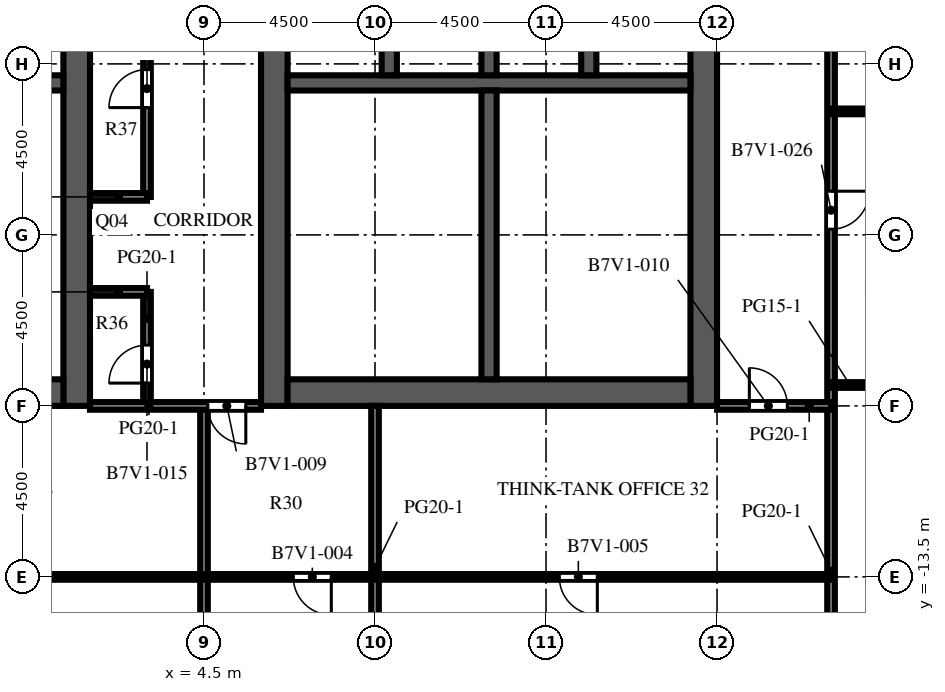
"""IFC4 building model, lengths in metres.
Left out: names, types, materials, properties, quantities, classifications, styles, units other than length and angle.
Written with IfcOpenShell. Run it as: python <this file> out.ifc"""

import sys

from ifc_helpers import new_model, si_unit, direction, frame, frame_2d, origin, place, context, subcontext, project, spatial, rectangle, extrude, element, fill, save


model = new_model("IFC4")
c1 = context("Model", 3, precision=1e-05, world=origin(), true_north=direction((0.0, 1.0)))
c2 = subcontext(c1, "Body", "Model", "MODEL_VIEW")
j1 = project(units=[si_unit("LENGTHUNIT", "METRE"), si_unit("PLANEANGLEUNIT", "RADIAN")], contexts=[c1])
p1 = place(None, origin())
s1 = spatial("IfcSite", under=j1, at=p1, CompositionType="ELEMENT")
p2 = place(p1, origin())
s2 = spatial("IfcBuilding", under=s1, at=p2, CompositionType="ELEMENT")
p3 = place(p2, frame((0.0, 0.0, 248.0)))
s3 = spatial("IfcBuildingStorey", under=s2, at=p3, CompositionType="ELEMENT", Elevation=248.0)
p4 = place(p3, frame((1.15, -9.0, 0.0), z_axis=(0.0, 0.0, 1.0), x_axis=(0.0, 1.0, 0.0)))
e1 = element("IfcWall", 1, at=p4, inside=s3, PredefinedType="SHEAR", context=c2, shape_type="SweptSolid", body=[
    extrude(rectangle(XDim=27.5, YDim=0.7, at=frame_2d((13.75, 0.0))), origin(), (0.0, 0.0, 1.0), 4.1),
])
p5 = place(p4, frame((12.55, 0.0, 0.0)))
e2 = element("IfcOpeningElement", 2, at=p5, cuts=e1, PredefinedType="OPENING", context=c2, shape_type="SweptSolid", body=[
    extrude(rectangle(XDim=2.4, YDim=2.4, at=frame_2d((1.2, 1.2))), frame((0.0, 0.36, 0.0), z_axis=(0.0, -1.0, 0.0), x_axis=(1.0, 0.0, 0.0)), (0.0, 0.0, 1.0), 0.72),
])
p6 = place(p4, frame((3.9, 0.0, 0.0)))
e3 = element("IfcOpeningElement", 3, at=p6, cuts=e1, PredefinedType="OPENING", context=c2, shape_type="SweptSolid", body=[
    extrude(rectangle(XDim=1.2, YDim=2.1, at=frame_2d((0.6, 1.05))), frame((0.0, 0.36, 0.0), z_axis=(0.0, -1.0, 0.0), x_axis=(1.0, 0.0, 0.0)), (0.0, 0.0, 1.0), 0.72),
])
p7 = place(p4, frame((22.4, 0.0, 0.0)))
e4 = element("IfcOpeningElement", 4, at=p7, cuts=e1, PredefinedType="OPENING", context=c2, shape_type="SweptSolid", body=[
    extrude(rectangle(XDim=1.2, YDim=2.1, at=frame_2d((0.6, 1.05))), frame((0.0, 0.36, 0.0), z_axis=(0.0, -1.0, 0.0), x_axis=(1.0, 0.0, 0.0)), (0.0, 0.0, 1.0), 0.72),
])
p8 = place(p3, frame((-9.8, -8.65, 0.0), z_axis=(0.0, 0.0, 1.0), x_axis=(1.0, 0.0, 0.0)))
e5 = element("IfcWall", 5, at=p8, inside=s3, PredefinedType="SHEAR", context=c2, shape_type="SweptSolid", body=[
    extrude(rectangle(XDim=10.6, YDim=0.7, at=frame_2d((5.3, 0.0))), origin(), (0.0, 0.0, 1.0), 4.1),
])
p9 = place(p3, frame((-9.8, -0.5, 0.0), z_axis=(0.0, 0.0, 1.0), x_axis=(1.0, 0.0, 0.0)))
e6 = element("IfcWall", 6, at=p9, inside=s3, PredefinedType="SHEAR", context=c2, shape_type="SweptSolid", body=[
    extrude(rectangle(XDim=10.6, YDim=0.4, at=frame_2d((5.3, 0.0))), origin(), (0.0, 0.0, 1.0), 4.1),
])
p10 = place(p3, frame((6.35, -9.0, 0.0), z_axis=(0.0, 0.0, 1.0), x_axis=(0.0, 1.0, 0.0)))
e7 = element("IfcWall", 7, at=p10, inside=s3, PredefinedType="SHEAR", context=c2, shape_type="SweptSolid", body=[
    extrude(rectangle(XDim=27.5, YDim=0.7, at=frame_2d((13.75, 0.0))), origin(), (0.0, 0.0, 1.0), 4.1),
])
p11 = place(p10, frame((12.55, 0.0, 0.0)))
e8 = element("IfcOpeningElement", 8, at=p11, cuts=e7, PredefinedType="OPENING", context=c2, shape_type="SweptSolid", body=[
    extrude(rectangle(XDim=2.4, YDim=2.4, at=frame_2d((1.2, 1.2))), frame((0.0, 0.36, 0.0), z_axis=(0.0, -1.0, 0.0), x_axis=(1.0, 0.0, 0.0)), (0.0, 0.0, 1.0), 0.72),
])
p12 = place(p10, frame((3.9, 0.0, 0.0)))
e9 = element("IfcOpeningElement", 9, at=p12, cuts=e7, PredefinedType="OPENING", context=c2, shape_type="SweptSolid", body=[
    extrude(rectangle(XDim=1.2, YDim=2.1, at=frame_2d((0.6, 1.05))), frame((0.0, 0.36, 0.0), z_axis=(0.0, -1.0, 0.0), x_axis=(1.0, 0.0, 0.0)), (0.0, 0.0, 1.0), 0.72),
])
p13 = place(p10, frame((22.4, 0.0, 0.0)))
e10 = element("IfcOpeningElement", 10, at=p13, cuts=e7, PredefinedType="OPENING", context=c2, shape_type="SweptSolid", body=[
    extrude(rectangle(XDim=1.2, YDim=2.1, at=frame_2d((0.6, 1.05))), frame((0.0, 0.36, 0.0), z_axis=(0.0, -1.0, 0.0), x_axis=(1.0, 0.0, 0.0)), (0.0, 0.0, 1.0), 0.72),
])
p14 = place(p3, frame((17.65, -9.0, 0.0), z_axis=(0.0, 0.0, 1.0), x_axis=(0.0, 1.0, 0.0)))
e11 = element("IfcWall", 11, at=p14, inside=s3, PredefinedType="SHEAR", context=c2, shape_type="SweptSolid", body=[
    extrude(rectangle(XDim=27.5, YDim=0.7, at=frame_2d((13.75, 0.0))), origin(), (0.0, 0.0, 1.0), 4.1),
])
p15 = place(p14, frame((12.55, 0.0, 0.0)))
e12 = element("IfcOpeningElement", 12, at=p15, cuts=e11, PredefinedType="OPENING", context=c2, shape_type="SweptSolid", body=[
    extrude(rectangle(XDim=2.4, YDim=2.4, at=frame_2d((1.2, 1.2))), frame((0.0, 0.36, 0.0), z_axis=(0.0, -1.0, 0.0), x_axis=(1.0, 0.0, 0.0)), (0.0, 0.0, 1.0), 0.72),
])
p16 = place(p14, frame((6.825, 0.0, 0.0)))
e13 = element("IfcOpeningElement", 13, at=p16, cuts=e11, PredefinedType="OPENING", context=c2, shape_type="SweptSolid", body=[
    extrude(rectangle(XDim=1.2, YDim=2.1, at=frame_2d((0.6, 1.05))), frame((0.0, 0.36, 0.0), z_axis=(0.0, -1.0, 0.0), x_axis=(1.0, 0.0, 0.0)), (0.0, 0.0, 1.0), 0.72),
])
p17 = place(p14, frame((19.475, 0.0, 0.0)))
e14 = element("IfcOpeningElement", 14, at=p17, cuts=e11, PredefinedType="OPENING", context=c2, shape_type="SweptSolid", body=[
    extrude(rectangle(XDim=1.2, YDim=2.1, at=frame_2d((0.6, 1.05))), frame((0.0, 0.36, 0.0), z_axis=(0.0, -1.0, 0.0), x_axis=(1.0, 0.0, 0.0)), (0.0, 0.0, 1.0), 0.72),
])
p18 = place(p3, frame((6.7, -8.65, 0.0), z_axis=(0.0, 0.0, 1.0), x_axis=(1.0, 0.0, 0.0)))
e15 = element("IfcWall", 15, at=p18, inside=s3, PredefinedType="SHEAR", context=c2, shape_type="SweptSolid", body=[
    extrude(rectangle(XDim=10.6, YDim=0.7, at=frame_2d((5.3, 0.0))), origin(), (0.0, 0.0, 1.0), 4.1),
])
p19 = place(p3, frame((6.7, -0.5, 0.0), z_axis=(0.0, 0.0, 1.0), x_axis=(1.0, 0.0, 0.0)))
e16 = element("IfcWall", 16, at=p19, inside=s3, PredefinedType="SHEAR", context=c2, shape_type="SweptSolid", body=[
    extrude(rectangle(XDim=10.6, YDim=0.4, at=frame_2d((5.3, 0.0))), origin(), (0.0, 0.0, 1.0), 4.1),
])
for number, where, z_axis, x_axis in (
    (17, (9.375, -0.3, 0.0), (0.0, 0.0, 1.0), (0.0, 1.0, 0.0)),
    (18, (12.0, -0.3, 0.0), (0.0, 0.0, 1.0), (0.0, 1.0, 0.0)),
    (19, (14.625, -0.3, 0.0), (0.0, 0.0, 1.0), (0.0, 1.0, 0.0)),
):
    element("IfcWall", number, at=place(p3, frame(where, z_axis=z_axis, x_axis=x_axis)), inside=s3, PredefinedType="SHEAR", context=c2, shape_type="SweptSolid", body=[
        extrude(rectangle(XDim=2.9, YDim=0.4, at=frame_2d((1.45, 0.0))), origin(), (0.0, 0.0, 1.0), 4.1),
    ])
p20 = place(p3, frame((12.0, -8.3, 0.0), z_axis=(0.0, 0.0, 1.0), x_axis=(0.0, 1.0, 0.0)))
e20 = element("IfcWall", 20, at=p20, inside=s3, PredefinedType="SHEAR", context=c2, shape_type="SweptSolid", body=[
    extrude(rectangle(XDim=7.6, YDim=0.4, at=frame_2d((3.8, 0.0))), origin(), (0.0, 0.0, 1.0), 4.1),
])
p21 = place(p3, frame((8.2, -8.3, 0.0), z_axis=(0.0, 0.0, 1.0), x_axis=(0.0, 1.0, 0.0)))
e21 = element("IfcWall", 21, at=p21, inside=s3, PredefinedType="PARTITIONING", context=c2, shape_type="SweptSolid", body=[
    extrude(rectangle(XDim=2.584, YDim=0.1, at=frame_2d((1.292, 0.0))), origin(), (0.0, 0.0, 1.0), 3.65),
])
p22 = place(p21, frame((0.792, 0.0, 0.0)))
e22 = element("IfcOpeningElement", 22, at=p22, cuts=e21, PredefinedType="OPENING", context=c2, shape_type="SweptSolid", body=[
    extrude(rectangle(XDim=1.0, YDim=2.1, at=frame_2d((0.5, 1.05))), frame((0.0, 0.06, 0.0), z_axis=(0.0, -1.0, 0.0), x_axis=(1.0, 0.0, 0.0)), (0.0, 0.0, 1.0), 0.12),
])
p23 = place(p3, frame((8.2, -5.716, 0.0), z_axis=(0.0, 0.0, 1.0), x_axis=(0.0, 1.0, 0.0)))
e23 = element("IfcWall", 23, at=p23, inside=s3, PredefinedType="PARTITIONING", context=c2, shape_type="SweptSolid", body=[
    extrude(rectangle(XDim=2.128, YDim=0.1, at=frame_2d((1.064, 0.0))), origin(), (0.0, 0.0, 1.0), 3.65),
])
p24 = place(p23, frame((0.564, 0.0, 0.0)))
e24 = element("IfcOpeningElement", 24, at=p24, cuts=e23, PredefinedType="OPENING", context=c2, shape_type="SweptSolid", body=[
    extrude(rectangle(XDim=1.0, YDim=2.1, at=frame_2d((0.5, 1.05))), frame((0.0, 0.06, 0.0), z_axis=(0.0, -1.0, 0.0), x_axis=(1.0, 0.0, 0.0)), (0.0, 0.0, 1.0), 0.12),
])
p25 = place(p3, frame((8.2, -3.588, 0.0), z_axis=(0.0, 0.0, 1.0), x_axis=(0.0, 1.0, 0.0)))
e25 = element("IfcWall", 25, at=p25, inside=s3, PredefinedType="PARTITIONING", context=c2, shape_type="SweptSolid", body=[
    extrude(rectangle(XDim=2.888, YDim=0.1, at=frame_2d((1.444, 0.0))), origin(), (0.0, 0.0, 1.0), 3.65),
])
p26 = place(p25, frame((0.944, 0.0, 0.0)))
e26 = element("IfcOpeningElement", 26, at=p26, cuts=e25, PredefinedType="OPENING", context=c2, shape_type="SweptSolid", body=[
    extrude(rectangle(XDim=1.0, YDim=2.1, at=frame_2d((0.5, 1.05))), frame((0.0, 0.06, 0.0), z_axis=(0.0, -1.0, 0.0), x_axis=(1.0, 0.0, 0.0)), (0.0, 0.0, 1.0), 0.12),
])
for number, where, z_axis, x_axis in (
    (27, (8.2, -5.716, 0.0), (0.0, 0.0, 1.0), (1.0, 0.0, 0.0)),
    (28, (8.2, -3.588, 0.0), (0.0, 0.0, 1.0), (1.0, 0.0, 0.0)),
):
    element("IfcWall", number, at=place(p3, frame(where, z_axis=z_axis, x_axis=x_axis)), inside=s3, PredefinedType="PARTITIONING", context=c2, shape_type="SweptSolid", body=[
        extrude(rectangle(XDim=3.6, YDim=0.1, at=frame_2d((1.8, 0.0))), origin(), (0.0, 0.0, 1.0), 3.65),
    ])
p27 = place(p3, frame((3.0, -9.0, 0.0), z_axis=(0.0, 0.0, 1.0), x_axis=(0.0, 1.0, 0.0)))
e29 = element("IfcWall", 29, at=p27, inside=s3, PredefinedType="PARTITIONING", context=c2, shape_type="SweptSolid", body=[
    extrude(rectangle(XDim=3.0, YDim=0.2, at=frame_2d((1.5, 0.0))), origin(), (0.0, 0.0, 1.0), 3.65),
])
p28 = place(p27, frame((0.6, 0.0, 0.0)))
e30 = element("IfcOpeningElement", 30, at=p28, cuts=e29, PredefinedType="OPENING", context=c2, shape_type="SweptSolid", body=[
    extrude(rectangle(XDim=1.0, YDim=2.1, at=frame_2d((0.5, 1.05))), frame((0.0, 0.11, 0.0), z_axis=(0.0, -1.0, 0.0), x_axis=(1.0, 0.0, 0.0)), (0.0, 0.0, 1.0), 0.22),
])
p29 = place(p3, frame((3.0, -3.5, 0.0), z_axis=(0.0, 0.0, 1.0), x_axis=(0.0, 1.0, 0.0)))
e31 = element("IfcWall", 31, at=p29, inside=s3, PredefinedType="PARTITIONING", context=c2, shape_type="SweptSolid", body=[
    extrude(rectangle(XDim=6.3, YDim=0.2, at=frame_2d((3.15, 0.0))), origin(), (0.0, 0.0, 1.0), 3.65),
])
p30 = place(p29, frame((2.35, 0.0, 0.0)))
e32 = element("IfcOpeningElement", 32, at=p30, cuts=e31, PredefinedType="OPENING", context=c2, shape_type="SweptSolid", body=[
    extrude(rectangle(XDim=1.0, YDim=2.1, at=frame_2d((0.5, 1.05))), frame((0.0, 0.11, 0.0), z_axis=(0.0, -1.0, 0.0), x_axis=(1.0, 0.0, 0.0)), (0.0, 0.0, 1.0), 0.22),
])
p31 = place(p3, frame((4.5, -22.1, 0.0), z_axis=(0.0, 0.0, 1.0), x_axis=(0.0, 1.0, 0.0)))
e33 = element("IfcWall", 33, at=p31, inside=s3, PredefinedType="PARTITIONING", context=c2, shape_type="SweptSolid", body=[
    extrude(rectangle(XDim=13.1, YDim=0.2, at=frame_2d((6.55, 0.0))), origin(), (0.0, 0.0, 1.0), 3.65),
])
p32 = place(p3, frame((9.0, -17.5, 0.0), z_axis=(0.0, 0.0, 1.0), x_axis=(0.0, 1.0, 0.0)))
e34 = element("IfcWall", 34, at=p32, inside=s3, PredefinedType="PARTITIONING", context=c2, shape_type="SweptSolid", body=[
    extrude(rectangle(XDim=8.5, YDim=0.2, at=frame_2d((4.25, 0.0))), origin(), (0.0, 0.0, 1.0), 3.65),
])
p33 = place(p3, frame((21.0, 3.25, 0.0), z_axis=(0.0, 0.0, 1.0), x_axis=(0.0, -1.0, 0.0)))
e35 = element("IfcWall", 35, at=p33, inside=s3, PredefinedType="PARTITIONING", context=c2, shape_type="SweptSolid", body=[
    extrude(rectangle(XDim=25.6, YDim=0.2, at=frame_2d((12.8, 0.0))), origin(), (0.0, 0.0, 1.0), 3.65),
])
p34 = place(p33, frame((6.6, 0.0, 0.0)))
e36 = element("IfcOpeningElement", 36, at=p34, cuts=e35, PredefinedType="OPENING", context=c2, shape_type="SweptSolid", body=[
    extrude(rectangle(XDim=1.0, YDim=2.1, at=frame_2d((0.5, 1.05))), frame((0.0, 0.11, 0.0), z_axis=(0.0, -1.0, 0.0), x_axis=(1.0, 0.0, 0.0)), (0.0, 0.0, 1.0), 0.22),
])
p35 = place(p3, frame((21.0, -13.5, 0.0), z_axis=(0.0, 0.0, 1.0), x_axis=(-1.0, 0.0, 0.0)))
e37 = element("IfcWall", 37, at=p35, inside=s3, PredefinedType="PARTITIONING", context=c2, shape_type="SweptSolid", body=[
    extrude(rectangle(XDim=34.5, YDim=0.15, at=frame_2d((17.25, 0.0))), origin(), (0.0, 0.0, 1.0), 3.65),
])
p36 = place(p35, frame((31.65, 0.0, 0.0)))
e38 = element("IfcOpeningElement", 38, at=p36, cuts=e37, PredefinedType="OPENING", context=c2, shape_type="SweptSolid", body=[
    extrude(rectangle(XDim=1.0, YDim=2.1, at=frame_2d((0.5, 1.05))), frame((0.0, 0.085, 0.0), z_axis=(0.0, -1.0, 0.0), x_axis=(1.0, 0.0, 0.0)), (0.0, 0.0, 1.0), 0.17),
])
p37 = place(p35, frame((22.15, 0.0, 0.0)))
e39 = element("IfcOpeningElement", 39, at=p37, cuts=e37, PredefinedType="OPENING", context=c2, shape_type="SweptSolid", body=[
    extrude(rectangle(XDim=1.0, YDim=2.1, at=frame_2d((0.5, 1.05))), frame((0.0, 0.085, 0.0), z_axis=(0.0, -1.0, 0.0), x_axis=(1.0, 0.0, 0.0)), (0.0, 0.0, 1.0), 0.17),
])
p38 = place(p35, frame((13.15, 0.0, 0.0)))
e40 = element("IfcOpeningElement", 40, at=p38, cuts=e37, PredefinedType="OPENING", context=c2, shape_type="SweptSolid", body=[
    extrude(rectangle(XDim=1.0, YDim=2.1, at=frame_2d((0.5, 1.05))), frame((0.0, 0.085, 0.0), z_axis=(0.0, -1.0, 0.0), x_axis=(1.0, 0.0, 0.0)), (0.0, 0.0, 1.0), 0.17),
])
p39 = place(p35, frame((6.15, 0.0, 0.0)))
e41 = element("IfcOpeningElement", 41, at=p39, cuts=e37, PredefinedType="OPENING", context=c2, shape_type="SweptSolid", body=[
    extrude(rectangle(XDim=1.0, YDim=2.1, at=frame_2d((0.5, 1.05))), frame((0.0, 0.085, 0.0), z_axis=(0.0, -1.0, 0.0), x_axis=(1.0, 0.0, 0.0)), (0.0, 0.0, 1.0), 0.17),
])
p40 = place(p3, frame((6.0, -9.0, 0.0), z_axis=(0.0, 0.0, 1.0), x_axis=(-1.0, 0.0, 0.0)))
e42 = element("IfcWall", 42, at=p40, inside=s3, PredefinedType="PARTITIONING", context=c2, shape_type="SweptSolid", body=[
    extrude(rectangle(XDim=4.5, YDim=0.2, at=frame_2d((2.25, 0.0))), origin(), (0.0, 0.0, 1.0), 3.65),
])
p41 = place(p40, frame((0.4, 0.0, 0.0)))
e43 = element("IfcOpeningElement", 43, at=p41, cuts=e42, PredefinedType="OPENING", context=c2, shape_type="SweptSolid", body=[
    extrude(rectangle(XDim=1.0, YDim=2.1, at=frame_2d((0.5, 1.05))), frame((0.0, 0.11, 0.0), z_axis=(0.0, -1.0, 0.0), x_axis=(1.0, 0.0, 0.0)), (0.0, 0.0, 1.0), 0.22),
])
p42 = place(p3, frame((21.0, -9.0, 0.0), z_axis=(0.0, 0.0, 1.0), x_axis=(-1.0, 0.0, 0.0)))
e44 = element("IfcWall", 44, at=p42, inside=s3, PredefinedType="PARTITIONING", context=c2, shape_type="SweptSolid", body=[
    extrude(rectangle(XDim=3.0, YDim=0.2, at=frame_2d((1.5, 0.0))), origin(), (0.0, 0.0, 1.0), 3.65),
])
p43 = place(p42, frame((1.15, 0.0, 0.0)))
e45 = element("IfcOpeningElement", 45, at=p43, cuts=e44, PredefinedType="OPENING", context=c2, shape_type="SweptSolid", body=[
    extrude(rectangle(XDim=1.0, YDim=2.1, at=frame_2d((0.5, 1.05))), frame((0.0, 0.11, 0.0), z_axis=(0.0, -1.0, 0.0), x_axis=(1.0, 0.0, 0.0)), (0.0, 0.0, 1.0), 0.22),
])
p44 = place(p3, frame((21.0, -8.45, 0.0), z_axis=(0.0, 0.0, 1.0), x_axis=(1.0, 0.0, 0.0)))
e46 = element("IfcWall", 46, at=p44, inside=s3, PredefinedType="PARTITIONING", context=c2, shape_type="SweptSolid", body=[
    extrude(rectangle(XDim=1.0, YDim=0.15, at=frame_2d((0.5, 0.0))), origin(), (0.0, 0.0, 1.0), 3.65),
])
for number, where, z_axis, x_axis in (
    (47, (1.5, -6.0, 0.0), (0.0, 0.0, 1.0), (1.0, 0.0, 0.0)),
    (48, (1.5, -3.5, 0.0), (0.0, 0.0, 1.0), (1.0, 0.0, 0.0)),
):
    element("IfcWall", number, at=place(p3, frame(where, z_axis=z_axis, x_axis=x_axis)), inside=s3, PredefinedType="PARTITIONING", context=c2, shape_type="SweptSolid", body=[
        extrude(rectangle(XDim=1.5, YDim=0.2, at=frame_2d((0.75, 0.0))), origin(), (0.0, 0.0, 1.0), 3.65),
    ])
p45 = place(p3, frame((21.0, -1.25, 0.0), z_axis=(0.0, 0.0, 1.0), x_axis=(1.0, 0.0, 0.0)))
e49 = element("IfcWall", 49, at=p45, inside=s3, PredefinedType="PARTITIONING", context=c2, shape_type="SweptSolid", body=[
    extrude(rectangle(XDim=5.85, YDim=0.15, at=frame_2d((2.925, 0.0))), origin(), (0.0, 0.0, 1.0), 3.65),
])
p46 = place(p45, frame((3.1, 0.0, 0.0)))
e50 = element("IfcOpeningElement", 50, at=p46, cuts=e49, PredefinedType="OPENING", context=c2, shape_type="SweptSolid", body=[
    extrude(rectangle(XDim=1.0, YDim=2.1, at=frame_2d((0.5, 1.05))), frame((0.0, 0.085, 0.0), z_axis=(0.0, -1.0, 0.0), x_axis=(1.0, 0.0, 0.0)), (0.0, 0.0, 1.0), 0.17),
])
p47 = place(p16, frame((1.2, 0.0, 0.0), z_axis=(0.0, 0.0, 1.0), x_axis=(-1.0, 0.0, 0.0)))
e51 = element("IfcDoor", 51, at=p47, inside=s3, OperationType="SINGLE_SWING_LEFT", PredefinedType="DOOR", context=c2, shape_type="SweptSolid", body=[
    extrude(rectangle(XDim=1.2, YDim=2.1, at=frame_2d((0.6, 1.05))), frame((0.0, 0.025, 0.0), z_axis=(0.0, -1.0, 0.0), x_axis=(1.0, 0.0, 0.0)), (0.0, 0.0, 1.0), 0.05),
])
fill(e13, e51)
p48 = place(p6, origin())
e52 = element("IfcDoor", 52, at=p48, inside=s3, OperationType="SINGLE_SWING_LEFT", PredefinedType="DOOR", context=c2, shape_type="SweptSolid", body=[
    extrude(rectangle(XDim=1.2, YDim=2.1, at=frame_2d((0.6, 1.05))), frame((0.0, 0.325, 0.0), z_axis=(0.0, -1.0, 0.0), x_axis=(1.0, 0.0, 0.0)), (0.0, 0.0, 1.0), 0.05),
])
fill(e3, e52)
p49 = place(p12, origin())
e53 = element("IfcDoor", 53, at=p49, inside=s3, OperationType="SINGLE_SWING_RIGHT", PredefinedType="DOOR", context=c2, shape_type="SweptSolid", body=[
    extrude(rectangle(XDim=1.2, YDim=2.1, at=frame_2d((0.6, 1.05))), frame((0.0, -0.275, 0.0), z_axis=(0.0, -1.0, 0.0), x_axis=(1.0, 0.0, 0.0)), (0.0, 0.0, 1.0), 0.05),
])
fill(e9, e53)
p50 = place(p22, origin())
e54 = element("IfcDoor", 54, at=p50, inside=s3, OperationType="SINGLE_SWING_LEFT", PredefinedType="DOOR", context=c2, shape_type="SweptSolid", body=[
    extrude(rectangle(XDim=1.0, YDim=2.1, at=frame_2d((0.5, 1.05))), frame((0.0, 0.025, 0.0), z_axis=(0.0, -1.0, 0.0), x_axis=(1.0, 0.0, 0.0)), (0.0, 0.0, 1.0), 0.05),
])
fill(e22, e54)
p51 = place(p24, origin())
e55 = element("IfcDoor", 55, at=p51, inside=s3, OperationType="SINGLE_SWING_RIGHT", PredefinedType="DOOR", context=c2, shape_type="SweptSolid", body=[
    extrude(rectangle(XDim=1.0, YDim=2.1, at=frame_2d((0.5, 1.05))), frame((0.0, 0.025, 0.0), z_axis=(0.0, -1.0, 0.0), x_axis=(1.0, 0.0, 0.0)), (0.0, 0.0, 1.0), 0.05),
])
fill(e24, e55)
p52 = place(p26, origin())
e56 = element("IfcDoor", 56, at=p52, inside=s3, OperationType="SINGLE_SWING_LEFT", PredefinedType="DOOR", context=c2, shape_type="SweptSolid", body=[
    extrude(rectangle(XDim=1.0, YDim=2.1, at=frame_2d((0.5, 1.05))), frame((0.0, 0.025, 0.0), z_axis=(0.0, -1.0, 0.0), x_axis=(1.0, 0.0, 0.0)), (0.0, 0.0, 1.0), 0.05),
])
fill(e26, e56)
p53 = place(p38, origin())
e57 = element("IfcDoor", 57, at=p53, inside=s3, OperationType="SINGLE_SWING_LEFT", PredefinedType="DOOR", context=c2, shape_type="SweptSolid", body=[
    extrude(rectangle(XDim=1.0, YDim=2.1, at=frame_2d((0.5, 1.05))), frame((0.0, 0.025, 0.0), z_axis=(0.0, -1.0, 0.0), x_axis=(1.0, 0.0, 0.0)), (0.0, 0.0, 1.0), 0.05),
])
fill(e40, e57)
p54 = place(p39, origin())
e58 = element("IfcDoor", 58, at=p54, inside=s3, OperationType="SINGLE_SWING_LEFT", PredefinedType="DOOR", context=c2, shape_type="SweptSolid", body=[
    extrude(rectangle(XDim=1.0, YDim=2.1, at=frame_2d((0.5, 1.05))), frame((0.0, 0.025, 0.0), z_axis=(0.0, -1.0, 0.0), x_axis=(1.0, 0.0, 0.0)), (0.0, 0.0, 1.0), 0.05),
])
fill(e41, e58)
p55 = place(p41, origin())
e59 = element("IfcDoor", 59, at=p55, inside=s3, OperationType="SINGLE_SWING_LEFT", PredefinedType="DOOR", context=c2, shape_type="SweptSolid", body=[
    extrude(rectangle(XDim=1.0, YDim=2.1, at=frame_2d((0.5, 1.05))), frame((0.0, 0.025, 0.0), z_axis=(0.0, -1.0, 0.0), x_axis=(1.0, 0.0, 0.0)), (0.0, 0.0, 1.0), 0.05),
])
fill(e43, e59)
p56 = place(p43, origin())
e60 = element("IfcDoor", 60, at=p56, inside=s3, OperationType="SINGLE_SWING_RIGHT", PredefinedType="DOOR", context=c2, shape_type="SweptSolid", body=[
    extrude(rectangle(XDim=1.0, YDim=2.1, at=frame_2d((0.5, 1.05))), frame((0.0, 0.025, 0.0), z_axis=(0.0, -1.0, 0.0), x_axis=(1.0, 0.0, 0.0)), (0.0, 0.0, 1.0), 0.05),
])
fill(e45, e60)
p57 = place(p28, origin())
e61 = element("IfcDoor", 61, at=p57, inside=s3, OperationType="SINGLE_SWING_LEFT", PredefinedType="DOOR", context=c2, shape_type="SweptSolid", body=[
    extrude(rectangle(XDim=1.0, YDim=2.1, at=frame_2d((0.5, 1.05))), frame((0.0, 0.025, 0.0), z_axis=(0.0, -1.0, 0.0), x_axis=(1.0, 0.0, 0.0)), (0.0, 0.0, 1.0), 0.05),
])
fill(e30, e61)
p58 = place(p30, origin())
e62 = element("IfcDoor", 62, at=p58, inside=s3, OperationType="SINGLE_SWING_LEFT", PredefinedType="DOOR", context=c2, shape_type="SweptSolid", body=[
    extrude(rectangle(XDim=1.0, YDim=2.1, at=frame_2d((0.5, 1.05))), frame((0.0, 0.025, 0.0), z_axis=(0.0, -1.0, 0.0), x_axis=(1.0, 0.0, 0.0)), (0.0, 0.0, 1.0), 0.05),
])
fill(e32, e62)
p59 = place(p34, origin())
e63 = element("IfcDoor", 63, at=p59, inside=s3, OperationType="SINGLE_SWING_LEFT", PredefinedType="DOOR", context=c2, shape_type="SweptSolid", body=[
    extrude(rectangle(XDim=1.0, YDim=2.1, at=frame_2d((0.5, 1.05))), frame((0.0, 0.025, 0.0), z_axis=(0.0, -1.0, 0.0), x_axis=(1.0, 0.0, 0.0)), (0.0, 0.0, 1.0), 0.05),
])
fill(e36, e63)
save(model, sys.argv[1])
